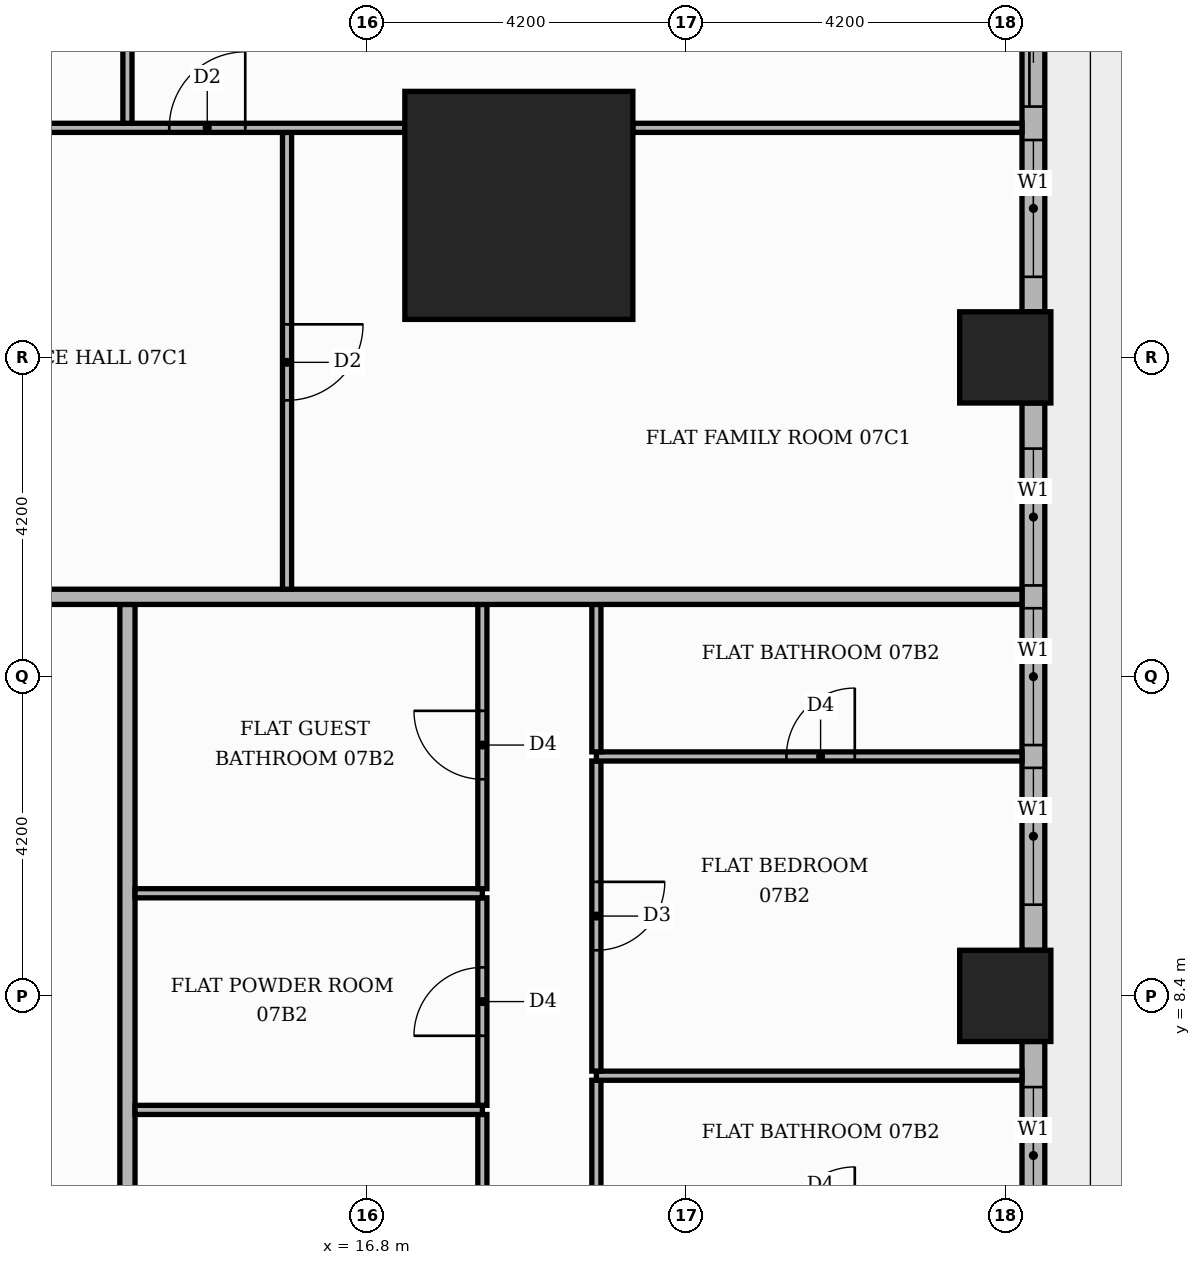
"""IFC4 building model, lengths in metres.
Left out: names, types, materials, properties, quantities, classifications, styles, units other than length and angle.
Written with IfcOpenShell. Run it as: python <this file> out.ifc"""

import sys

from ifc_helpers import new_model, si_unit, direction, frame, frame_2d, origin, origin_2d, place, context, subcontext, project, spatial, rectangle, extrude, element, fill, save


model = new_model("IFC4")
c1 = context("Model", 3, precision=1e-05, world=origin(), true_north=direction((0.0, 1.0)))
c2 = subcontext(c1, "Body", "Model", "MODEL_VIEW")
j1 = project(units=[si_unit("LENGTHUNIT", "METRE"), si_unit("PLANEANGLEUNIT", "RADIAN")], contexts=[c1])
p1 = place(None, origin())
s1 = spatial("IfcSite", under=j1, at=p1, CompositionType="ELEMENT")
p2 = place(p1, origin())
s2 = spatial("IfcBuilding", under=s1, at=p2, CompositionType="ELEMENT")
p3 = place(p2, frame((0.0, 0.0, 34.8)))
s3 = spatial("IfcBuildingStorey", under=s2, at=p3, CompositionType="ELEMENT", Elevation=34.8)
p4 = place(p3, frame((18.8, 18.8, 0.0), z_axis=(0.0, 0.0, 1.0), x_axis=(1.0, 0.0, 0.0)))
e1 = element("IfcColumn", 1, at=p4, inside=s3, PredefinedType="COLUMN", context=c2, shape_type="SweptSolid", body=[
    extrude(rectangle(XDim=3.0, YDim=3.0, at=origin_2d()), origin(), (0.0, 0.0, 1.0), 3.9),
])
for number, where, z_axis, x_axis in (
    (2, (25.2, 8.4, 0.0), (0.0, 0.0, 1.0), (1.0, 0.0, 0.0)),
    (3, (25.2, 16.8, 0.0), (0.0, 0.0, 1.0), (1.0, 0.0, 0.0)),
):
    element("IfcColumn", number, at=place(p3, frame(where, z_axis=z_axis, x_axis=x_axis)), inside=s3, PredefinedType="COLUMN", context=c2, shape_type="SweptSolid", body=[
        extrude(rectangle(XDim=1.2, YDim=1.2, at=origin_2d()), origin(), (0.0, 0.0, 1.0), 3.9),
    ])
p5 = place(p3, frame((25.57, 0.6, 0.0), z_axis=(0.0, 0.0, 1.0), x_axis=(0.0, 1.0, 0.0)))
e4 = element("IfcWall", 4, at=p5, inside=s3, PredefinedType="STANDARD", context=c2, shape_type="SweptSolid", body=[
    extrude(rectangle(XDim=7.2, YDim=0.3, at=frame_2d((3.6, 0.0))), origin(), (0.0, 0.0, 1.0), 3.48),
])
p6 = place(p5, frame((0.6, 0.0, 0.0)))
e5 = element("IfcOpeningElement", 5, at=p6, cuts=e4, PredefinedType="OPENING", context=c2, shape_type="SweptSolid", body=[
    extrude(rectangle(XDim=1.8, YDim=2.4, at=frame_2d((0.9, 1.2))), frame((0.0, 0.16, 0.0), z_axis=(0.0, -1.0, 0.0), x_axis=(1.0, 0.0, 0.0)), (0.0, 0.0, 1.0), 0.32),
])
p7 = place(p5, frame((2.7, 0.0, 0.9)))
e6 = element("IfcOpeningElement", 6, at=p7, cuts=e4, PredefinedType="OPENING", context=c2, shape_type="SweptSolid", body=[
    extrude(rectangle(XDim=1.8, YDim=2.1, at=frame_2d((0.9, 1.05))), frame((0.0, 0.16, 0.0), z_axis=(0.0, -1.0, 0.0), x_axis=(1.0, 0.0, 0.0)), (0.0, 0.0, 1.0), 0.32),
])
p8 = place(p5, frame((4.8, 0.0, 0.9)))
e7 = element("IfcOpeningElement", 7, at=p8, cuts=e4, PredefinedType="OPENING", context=c2, shape_type="SweptSolid", body=[
    extrude(rectangle(XDim=1.8, YDim=2.1, at=frame_2d((0.9, 1.05))), frame((0.0, 0.16, 0.0), z_axis=(0.0, -1.0, 0.0), x_axis=(1.0, 0.0, 0.0)), (0.0, 0.0, 1.0), 0.32),
])
p9 = place(p3, frame((25.57, 9.0, 0.0), z_axis=(0.0, 0.0, 1.0), x_axis=(0.0, 1.0, 0.0)))
e8 = element("IfcWall", 8, at=p9, inside=s3, PredefinedType="STANDARD", context=c2, shape_type="SweptSolid", body=[
    extrude(rectangle(XDim=7.2, YDim=0.3, at=frame_2d((3.6, 0.0))), origin(), (0.0, 0.0, 1.0), 3.48),
])
p10 = place(p9, frame((0.6, 0.0, 0.9)))
e9 = element("IfcOpeningElement", 9, at=p10, cuts=e8, PredefinedType="OPENING", context=c2, shape_type="SweptSolid", body=[
    extrude(rectangle(XDim=1.8, YDim=2.1, at=frame_2d((0.9, 1.05))), frame((0.0, 0.16, 0.0), z_axis=(0.0, -1.0, 0.0), x_axis=(1.0, 0.0, 0.0)), (0.0, 0.0, 1.0), 0.32),
])
p11 = place(p9, frame((2.7, 0.0, 0.9)))
e10 = element("IfcOpeningElement", 10, at=p11, cuts=e8, PredefinedType="OPENING", context=c2, shape_type="SweptSolid", body=[
    extrude(rectangle(XDim=1.8, YDim=2.1, at=frame_2d((0.9, 1.05))), frame((0.0, 0.16, 0.0), z_axis=(0.0, -1.0, 0.0), x_axis=(1.0, 0.0, 0.0)), (0.0, 0.0, 1.0), 0.32),
])
p12 = place(p9, frame((4.8, 0.0, 0.9)))
e11 = element("IfcOpeningElement", 11, at=p12, cuts=e8, PredefinedType="OPENING", context=c2, shape_type="SweptSolid", body=[
    extrude(rectangle(XDim=1.8, YDim=2.1, at=frame_2d((0.9, 1.05))), frame((0.0, 0.16, 0.0), z_axis=(0.0, -1.0, 0.0), x_axis=(1.0, 0.0, 0.0)), (0.0, 0.0, 1.0), 0.32),
])
p13 = place(p3, frame((25.57, 17.4, 0.0), z_axis=(0.0, 0.0, 1.0), x_axis=(0.0, 1.0, 0.0)))
e12 = element("IfcWall", 12, at=p13, inside=s3, PredefinedType="STANDARD", context=c2, shape_type="SweptSolid", body=[
    extrude(rectangle(XDim=5.32, YDim=0.3, at=frame_2d((2.66, 0.0))), origin(), (0.0, 0.0, 1.0), 3.48),
])
p14 = place(p13, frame((2.7, 0.0, 0.0)))
e13 = element("IfcOpeningElement", 13, at=p14, cuts=e12, PredefinedType="OPENING", context=c2, shape_type="SweptSolid", body=[
    extrude(rectangle(XDim=1.8, YDim=2.4, at=frame_2d((0.9, 1.2))), frame((0.0, 0.16, 0.0), z_axis=(0.0, -1.0, 0.0), x_axis=(1.0, 0.0, 0.0)), (0.0, 0.0, 1.0), 0.32),
])
p15 = place(p13, frame((0.46, 0.0, 0.9)))
e14 = element("IfcOpeningElement", 14, at=p15, cuts=e12, PredefinedType="OPENING", context=c2, shape_type="SweptSolid", body=[
    extrude(rectangle(XDim=1.8, YDim=2.1, at=frame_2d((0.9, 1.05))), frame((0.0, 0.16, 0.0), z_axis=(0.0, -1.0, 0.0), x_axis=(1.0, 0.0, 0.0)), (0.0, 0.0, 1.0), 0.32),
])
p16 = place(p3, frame((13.65, -5.15, 0.0), z_axis=(0.0, 0.0, 1.0), x_axis=(0.0, 1.0, 0.0)))
e15 = element("IfcWall", 15, at=p16, inside=s3, PredefinedType="PARTITIONING", context=c2, shape_type="SweptSolid", body=[
    extrude(rectangle(XDim=18.7, YDim=0.2, at=frame_2d((9.35, 0.0))), origin(), (0.0, 0.0, 1.0), 3.48),
])
p17 = place(p16, frame((3.55, 0.0, 0.0)))
e16 = element("IfcOpeningElement", 16, at=p17, cuts=e15, PredefinedType="OPENING", context=c2, shape_type="SweptSolid", body=[
    extrude(rectangle(XDim=1.1, YDim=2.4, at=frame_2d((0.55, 1.2))), frame((0.0, 0.11, 0.0), z_axis=(0.0, -1.0, 0.0), x_axis=(1.0, 0.0, 0.0)), (0.0, 0.0, 1.0), 0.22),
])
p18 = place(p3, frame((18.32, 1.11, 0.0), z_axis=(0.0, 0.0, 1.0), x_axis=(0.0, 1.0, 0.0)))
e17 = element("IfcWall", 17, at=p18, inside=s3, PredefinedType="PARTITIONING", context=c2, shape_type="SweptSolid", body=[
    extrude(rectangle(XDim=5.73, YDim=0.12, at=frame_2d((2.865, 0.0))), origin(), (0.0, 0.0, 1.0), 3.48),
])
p19 = place(p18, frame((2.415, 0.0, 0.0)))
e18 = element("IfcOpeningElement", 18, at=p19, cuts=e17, PredefinedType="OPENING", context=c2, shape_type="SweptSolid", body=[
    extrude(rectangle(XDim=0.9, YDim=2.1, at=frame_2d((0.45, 1.05))), frame((0.0, 0.07, 0.0), z_axis=(0.0, -1.0, 0.0), x_axis=(1.0, 0.0, 0.0)), (0.0, 0.0, 1.0), 0.14),
])
p20 = place(p3, frame((19.82, 5.31, 0.0), z_axis=(0.0, 0.0, 1.0), x_axis=(0.0, 1.0, 0.0)))
e19 = element("IfcWall", 19, at=p20, inside=s3, PredefinedType="PARTITIONING", context=c2, shape_type="SweptSolid", body=[
    extrude(rectangle(XDim=1.98, YDim=0.12, at=frame_2d((0.99, 0.0))), origin(), (0.0, 0.0, 1.0), 3.48),
])
p21 = place(p3, frame((13.75, 6.9, 0.0), z_axis=(0.0, 0.0, 1.0), x_axis=(1.0, 0.0, 0.0)))
e20 = element("IfcWall", 20, at=p21, inside=s3, PredefinedType="PARTITIONING", context=c2, shape_type="SweptSolid", body=[
    extrude(rectangle(XDim=4.57, YDim=0.12, at=frame_2d((2.285, 0.0))), origin(), (0.0, 0.0, 1.0), 3.48),
])
p22 = place(p3, frame((18.32, 6.96, 0.0), z_axis=(0.0, 0.0, 1.0), x_axis=(0.0, 1.0, 0.0)))
e21 = element("IfcWall", 21, at=p22, inside=s3, PredefinedType="PARTITIONING", context=c2, shape_type="SweptSolid", body=[
    extrude(rectangle(XDim=2.73, YDim=0.12, at=frame_2d((1.365, 0.0))), origin(), (0.0, 0.0, 1.0), 3.48),
])
p23 = place(p22, frame((0.915, 0.0, 0.0)))
e22 = element("IfcOpeningElement", 22, at=p23, cuts=e21, PredefinedType="OPENING", context=c2, shape_type="SweptSolid", body=[
    extrude(rectangle(XDim=0.9, YDim=2.1, at=frame_2d((0.45, 1.05))), frame((0.0, 0.07, 0.0), z_axis=(0.0, -1.0, 0.0), x_axis=(1.0, 0.0, 0.0)), (0.0, 0.0, 1.0), 0.14),
])
p24 = place(p3, frame((19.82, 7.35, 0.0), z_axis=(0.0, 0.0, 1.0), x_axis=(1.0, 0.0, 0.0)))
e23 = element("IfcWall", 23, at=p24, inside=s3, PredefinedType="PARTITIONING", context=c2, shape_type="SweptSolid", body=[
    extrude(rectangle(XDim=5.6, YDim=0.12, at=frame_2d((2.8, 0.0))), origin(), (0.0, 0.0, 1.0), 3.48),
])
p25 = place(p3, frame((19.82, 7.41, 0.0), z_axis=(0.0, 0.0, 1.0), x_axis=(0.0, 1.0, 0.0)))
e24 = element("IfcWall", 24, at=p25, inside=s3, PredefinedType="PARTITIONING", context=c2, shape_type="SweptSolid", body=[
    extrude(rectangle(XDim=4.08, YDim=0.12, at=frame_2d((2.04, 0.0))), origin(), (0.0, 0.0, 1.0), 3.48),
])
p26 = place(p25, frame((1.59, 0.0, 0.0)))
e25 = element("IfcOpeningElement", 25, at=p26, cuts=e24, PredefinedType="OPENING", context=c2, shape_type="SweptSolid", body=[
    extrude(rectangle(XDim=0.9, YDim=2.1, at=frame_2d((0.45, 1.05))), frame((0.0, 0.07, 0.0), z_axis=(0.0, -1.0, 0.0), x_axis=(1.0, 0.0, 0.0)), (0.0, 0.0, 1.0), 0.14),
])
p27 = place(p3, frame((13.75, 9.75, 0.0), z_axis=(0.0, 0.0, 1.0), x_axis=(1.0, 0.0, 0.0)))
e26 = element("IfcWall", 26, at=p27, inside=s3, PredefinedType="PARTITIONING", context=c2, shape_type="SweptSolid", body=[
    extrude(rectangle(XDim=4.57, YDim=0.12, at=frame_2d((2.285, 0.0))), origin(), (0.0, 0.0, 1.0), 3.48),
])
p28 = place(p3, frame((18.32, 9.81, 0.0), z_axis=(0.0, 0.0, 1.0), x_axis=(0.0, 1.0, 0.0)))
e27 = element("IfcWall", 27, at=p28, inside=s3, PredefinedType="PARTITIONING", context=c2, shape_type="SweptSolid", body=[
    extrude(rectangle(XDim=3.74, YDim=0.12, at=frame_2d((1.87, 0.0))), origin(), (0.0, 0.0, 1.0), 3.48),
])
p29 = place(p28, frame((1.44, 0.0, 0.0)))
e28 = element("IfcOpeningElement", 28, at=p29, cuts=e27, PredefinedType="OPENING", context=c2, shape_type="SweptSolid", body=[
    extrude(rectangle(XDim=0.9, YDim=2.1, at=frame_2d((0.45, 1.05))), frame((0.0, 0.07, 0.0), z_axis=(0.0, -1.0, 0.0), x_axis=(1.0, 0.0, 0.0)), (0.0, 0.0, 1.0), 0.14),
])
p30 = place(p3, frame((19.82, 11.55, 0.0), z_axis=(0.0, 0.0, 1.0), x_axis=(1.0, 0.0, 0.0)))
e29 = element("IfcWall", 29, at=p30, inside=s3, PredefinedType="PARTITIONING", context=c2, shape_type="SweptSolid", body=[
    extrude(rectangle(XDim=5.6, YDim=0.12, at=frame_2d((2.8, 0.0))), origin(), (0.0, 0.0, 1.0), 3.48),
])
p31 = place(p30, frame((2.5, 0.0, 0.0)))
e30 = element("IfcOpeningElement", 30, at=p31, cuts=e29, PredefinedType="OPENING", context=c2, shape_type="SweptSolid", body=[
    extrude(rectangle(XDim=0.9, YDim=2.1, at=frame_2d((0.45, 1.05))), frame((0.0, 0.07, 0.0), z_axis=(0.0, -1.0, 0.0), x_axis=(1.0, 0.0, 0.0)), (0.0, 0.0, 1.0), 0.14),
])
p32 = place(p3, frame((19.82, 11.61, 0.0), z_axis=(0.0, 0.0, 1.0), x_axis=(0.0, 1.0, 0.0)))
e31 = element("IfcWall", 31, at=p32, inside=s3, PredefinedType="PARTITIONING", context=c2, shape_type="SweptSolid", body=[
    extrude(rectangle(XDim=1.94, YDim=0.12, at=frame_2d((0.97, 0.0))), origin(), (0.0, 0.0, 1.0), 3.48),
])
p33 = place(p3, frame((-13.65, 13.65, 0.0), z_axis=(0.0, 0.0, 1.0), x_axis=(1.0, 0.0, 0.0)))
e32 = element("IfcWall", 32, at=p33, inside=s3, PredefinedType="PARTITIONING", context=c2, shape_type="SweptSolid", body=[
    extrude(rectangle(XDim=39.07, YDim=0.2, at=frame_2d((19.535, 0.0))), origin(), (0.0, 0.0, 1.0), 3.48),
])
p34 = place(p33, frame((24.65, 0.0, 0.0)))
e33 = element("IfcOpeningElement", 33, at=p34, cuts=e32, PredefinedType="OPENING", context=c2, shape_type="SweptSolid", body=[
    extrude(rectangle(XDim=1.1, YDim=2.4, at=frame_2d((0.55, 1.2))), frame((0.0, 0.11, 0.0), z_axis=(0.0, -1.0, 0.0), x_axis=(1.0, 0.0, 0.0)), (0.0, 0.0, 1.0), 0.22),
])
p35 = place(p33, frame((14.15, 0.0, 0.0)))
e34 = element("IfcOpeningElement", 34, at=p35, cuts=e32, PredefinedType="OPENING", context=c2, shape_type="SweptSolid", body=[
    extrude(rectangle(XDim=1.1, YDim=2.4, at=frame_2d((0.55, 1.2))), frame((0.0, 0.11, 0.0), z_axis=(0.0, -1.0, 0.0), x_axis=(1.0, 0.0, 0.0)), (0.0, 0.0, 1.0), 0.22),
])
p36 = place(p3, frame((15.75, 13.75, 0.0), z_axis=(0.0, 0.0, 1.0), x_axis=(0.0, 1.0, 0.0)))
e35 = element("IfcWall", 35, at=p36, inside=s3, PredefinedType="PARTITIONING", context=c2, shape_type="SweptSolid", body=[
    extrude(rectangle(XDim=6.01, YDim=0.12, at=frame_2d((3.005, 0.0))), origin(), (0.0, 0.0, 1.0), 3.48),
])
p37 = place(p36, frame((2.485, 0.0, 0.0)))
e36 = element("IfcOpeningElement", 36, at=p37, cuts=e35, PredefinedType="OPENING", context=c2, shape_type="SweptSolid", body=[
    extrude(rectangle(XDim=1.0, YDim=2.1, at=frame_2d((0.5, 1.05))), frame((0.0, 0.07, 0.0), z_axis=(0.0, -1.0, 0.0), x_axis=(1.0, 0.0, 0.0)), (0.0, 0.0, 1.0), 0.14),
])
p38 = place(p3, frame((5.35, 19.82, 0.0), z_axis=(0.0, 0.0, 1.0), x_axis=(1.0, 0.0, 0.0)))
e37 = element("IfcWall", 37, at=p38, inside=s3, PredefinedType="PARTITIONING", context=c2, shape_type="SweptSolid", body=[
    extrude(rectangle(XDim=11.95, YDim=0.12, at=frame_2d((5.975, 0.0))), origin(), (0.0, 0.0, 1.0), 3.48),
])
p39 = place(p38, frame((8.85, 0.0, 0.0)))
e38 = element("IfcOpeningElement", 38, at=p39, cuts=e37, PredefinedType="OPENING", context=c2, shape_type="SweptSolid", body=[
    extrude(rectangle(XDim=1.0, YDim=2.1, at=frame_2d((0.5, 1.05))), frame((0.0, 0.07, 0.0), z_axis=(0.0, -1.0, 0.0), x_axis=(1.0, 0.0, 0.0)), (0.0, 0.0, 1.0), 0.14),
])
p40 = place(p38, frame((5.75, 0.0, 0.0)))
e39 = element("IfcOpeningElement", 39, at=p40, cuts=e37, PredefinedType="OPENING", context=c2, shape_type="SweptSolid", body=[
    extrude(rectangle(XDim=0.9, YDim=2.1, at=frame_2d((0.45, 1.05))), frame((0.0, 0.07, 0.0), z_axis=(0.0, -1.0, 0.0), x_axis=(1.0, 0.0, 0.0)), (0.0, 0.0, 1.0), 0.14),
])
p41 = place(p3, frame((20.3, 19.82, 0.0), z_axis=(0.0, 0.0, 1.0), x_axis=(1.0, 0.0, 0.0)))
e40 = element("IfcWall", 40, at=p41, inside=s3, PredefinedType="PARTITIONING", context=c2, shape_type="SweptSolid", body=[
    extrude(rectangle(XDim=5.12, YDim=0.12, at=frame_2d((2.56, 0.0))), origin(), (0.0, 0.0, 1.0), 3.48),
])
p42 = place(p3, frame((13.65, 19.88, 0.0), z_axis=(0.0, 0.0, 1.0), x_axis=(0.0, 1.0, 0.0)))
e41 = element("IfcWall", 41, at=p42, inside=s3, PredefinedType="PARTITIONING", context=c2, shape_type="SweptSolid", body=[
    extrude(rectangle(XDim=5.54, YDim=0.12, at=frame_2d((2.77, 0.0))), origin(), (0.0, 0.0, 1.0), 3.48),
])
p43 = place(p8, origin())
e42 = element("IfcWindow", 42, at=p43, inside=s3, PartitioningType="SINGLE_PANEL", PredefinedType="WINDOW", context=c2, shape_type="SweptSolid", body=[
    extrude(rectangle(XDim=1.8, YDim=2.1, at=frame_2d((0.9, 1.05))), frame((0.0, 0.03, 0.0), z_axis=(0.0, -1.0, 0.0), x_axis=(1.0, 0.0, 0.0)), (0.0, 0.0, 1.0), 0.06),
])
fill(e7, e42)
p44 = place(p10, origin())
e43 = element("IfcWindow", 43, at=p44, inside=s3, PartitioningType="SINGLE_PANEL", PredefinedType="WINDOW", context=c2, shape_type="SweptSolid", body=[
    extrude(rectangle(XDim=1.8, YDim=2.1, at=frame_2d((0.9, 1.05))), frame((0.0, 0.03, 0.0), z_axis=(0.0, -1.0, 0.0), x_axis=(1.0, 0.0, 0.0)), (0.0, 0.0, 1.0), 0.06),
])
fill(e9, e43)
p45 = place(p11, origin())
e44 = element("IfcWindow", 44, at=p45, inside=s3, PartitioningType="SINGLE_PANEL", PredefinedType="WINDOW", context=c2, shape_type="SweptSolid", body=[
    extrude(rectangle(XDim=1.8, YDim=2.1, at=frame_2d((0.9, 1.05))), frame((0.0, 0.03, 0.0), z_axis=(0.0, -1.0, 0.0), x_axis=(1.0, 0.0, 0.0)), (0.0, 0.0, 1.0), 0.06),
])
fill(e10, e44)
p46 = place(p12, origin())
e45 = element("IfcWindow", 45, at=p46, inside=s3, PartitioningType="SINGLE_PANEL", PredefinedType="WINDOW", context=c2, shape_type="SweptSolid", body=[
    extrude(rectangle(XDim=1.8, YDim=2.1, at=frame_2d((0.9, 1.05))), frame((0.0, 0.03, 0.0), z_axis=(0.0, -1.0, 0.0), x_axis=(1.0, 0.0, 0.0)), (0.0, 0.0, 1.0), 0.06),
])
fill(e11, e45)
p47 = place(p14, origin())
e46 = element("IfcDoor", 46, at=p47, inside=s3, OperationType="SLIDING_TO_LEFT", PredefinedType="DOOR", context=c2, shape_type="SweptSolid", body=[
    extrude(rectangle(XDim=1.8, YDim=2.4, at=frame_2d((0.9, 1.2))), frame((0.0, 0.025, 0.0), z_axis=(0.0, -1.0, 0.0), x_axis=(1.0, 0.0, 0.0)), (0.0, 0.0, 1.0), 0.05),
])
fill(e13, e46)
p48 = place(p15, origin())
e47 = element("IfcWindow", 47, at=p48, inside=s3, PartitioningType="SINGLE_PANEL", PredefinedType="WINDOW", context=c2, shape_type="SweptSolid", body=[
    extrude(rectangle(XDim=1.8, YDim=2.1, at=frame_2d((0.9, 1.05))), frame((0.0, 0.03, 0.0), z_axis=(0.0, -1.0, 0.0), x_axis=(1.0, 0.0, 0.0)), (0.0, 0.0, 1.0), 0.06),
])
fill(e14, e47)
p49 = place(p23, origin())
e48 = element("IfcDoor", 48, at=p49, inside=s3, OperationType="SINGLE_SWING_LEFT", PredefinedType="DOOR", context=c2, shape_type="SweptSolid", body=[
    extrude(rectangle(XDim=0.9, YDim=2.1, at=frame_2d((0.45, 1.05))), frame((0.0, 0.025, 0.0), z_axis=(0.0, -1.0, 0.0), x_axis=(1.0, 0.0, 0.0)), (0.0, 0.0, 1.0), 0.05),
])
fill(e22, e48)
p50 = place(p29, origin())
e49 = element("IfcDoor", 49, at=p50, inside=s3, OperationType="SINGLE_SWING_RIGHT", PredefinedType="DOOR", context=c2, shape_type="SweptSolid", body=[
    extrude(rectangle(XDim=0.9, YDim=2.1, at=frame_2d((0.45, 1.05))), frame((0.0, 0.025, 0.0), z_axis=(0.0, -1.0, 0.0), x_axis=(1.0, 0.0, 0.0)), (0.0, 0.0, 1.0), 0.05),
])
fill(e28, e49)
p51 = place(p26, frame((0.9, 0.0, 0.0), z_axis=(0.0, 0.0, 1.0), x_axis=(-1.0, 0.0, 0.0)))
e50 = element("IfcDoor", 50, at=p51, inside=s3, OperationType="SINGLE_SWING_RIGHT", PredefinedType="DOOR", context=c2, shape_type="SweptSolid", body=[
    extrude(rectangle(XDim=0.9, YDim=2.1, at=frame_2d((0.45, 1.05))), frame((0.0, 0.025, 0.0), z_axis=(0.0, -1.0, 0.0), x_axis=(1.0, 0.0, 0.0)), (0.0, 0.0, 1.0), 0.05),
])
fill(e25, e50)
p52 = place(p31, origin())
e51 = element("IfcDoor", 51, at=p52, inside=s3, OperationType="SINGLE_SWING_RIGHT", PredefinedType="DOOR", context=c2, shape_type="SweptSolid", body=[
    extrude(rectangle(XDim=0.9, YDim=2.1, at=frame_2d((0.45, 1.05))), frame((0.0, 0.025, 0.0), z_axis=(0.0, -1.0, 0.0), x_axis=(1.0, 0.0, 0.0)), (0.0, 0.0, 1.0), 0.05),
])
fill(e30, e51)
p53 = place(p37, frame((1.0, 0.0, 0.0), z_axis=(0.0, 0.0, 1.0), x_axis=(-1.0, 0.0, 0.0)))
e52 = element("IfcDoor", 52, at=p53, inside=s3, OperationType="SINGLE_SWING_RIGHT", PredefinedType="DOOR", context=c2, shape_type="SweptSolid", body=[
    extrude(rectangle(XDim=1.0, YDim=2.1, at=frame_2d((0.5, 1.05))), frame((0.0, 0.025, 0.0), z_axis=(0.0, -1.0, 0.0), x_axis=(1.0, 0.0, 0.0)), (0.0, 0.0, 1.0), 0.05),
])
fill(e36, e52)
p54 = place(p39, origin())
e53 = element("IfcDoor", 53, at=p54, inside=s3, OperationType="SINGLE_SWING_RIGHT", PredefinedType="DOOR", context=c2, shape_type="SweptSolid", body=[
    extrude(rectangle(XDim=1.0, YDim=2.1, at=frame_2d((0.5, 1.05))), frame((0.0, 0.025, 0.0), z_axis=(0.0, -1.0, 0.0), x_axis=(1.0, 0.0, 0.0)), (0.0, 0.0, 1.0), 0.05),
])
fill(e38, e53)
save(model, sys.argv[1])
